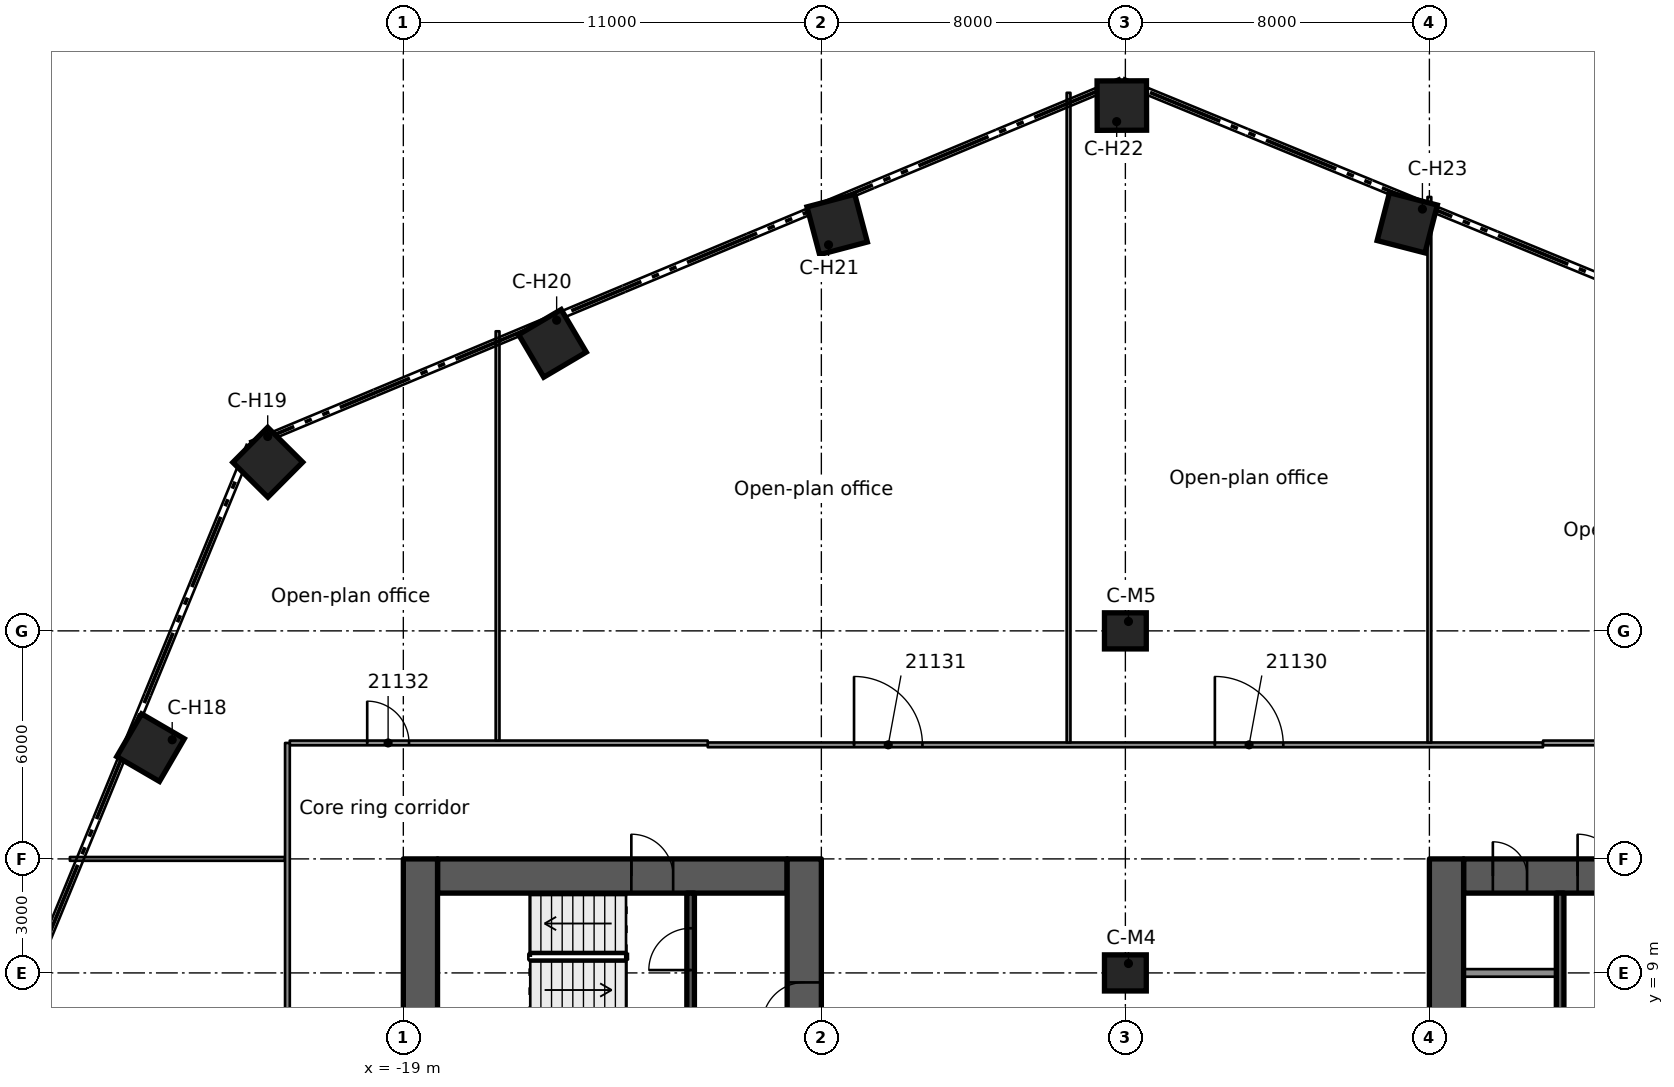
"""IFC4 building model, lengths in metres.
Left out: names, types, materials, properties, quantities, classifications, styles, units other than length and angle.
Written with IfcOpenShell. Run it as: python <this file> out.ifc"""

import sys

from ifc_helpers import new_model, si_unit, direction, frame, frame_2d, origin, origin_2d, place, context, subcontext, project, spatial, rectangle, extrude, element, fill, save


model = new_model("IFC4")
c1 = context("Model", 3, precision=1e-05, world=origin(), true_north=direction((0.0, 1.0)))
c2 = subcontext(c1, "Body", "Model", "MODEL_VIEW")
j1 = project(units=[si_unit("LENGTHUNIT", "METRE"), si_unit("PLANEANGLEUNIT", "RADIAN")], contexts=[c1])
p1 = place(None, origin())
s1 = spatial("IfcSite", under=j1, at=p1, CompositionType="ELEMENT")
p2 = place(p1, origin())
s2 = spatial("IfcBuilding", under=s1, at=p2, CompositionType="ELEMENT")
p3 = place(p2, frame((0.0, 0.0, 105.7)))
s3 = spatial("IfcBuildingStorey", under=s2, at=p3, CompositionType="ELEMENT", Elevation=105.7)
p4 = place(p3, frame((-18.1, 11.55, 0.0), z_axis=(0.0, 0.0, 1.0), x_axis=(1.0, 0.0, 0.0)))
e1 = element("IfcWall", 1, at=p4, inside=s3, PredefinedType="SHEAR", context=c2, shape_type="SweptSolid", body=[
    extrude(rectangle(XDim=9.2, YDim=0.9, at=frame_2d((4.6, 0.0))), origin(), (0.0, 0.0, 1.0), 3.5),
])
p5 = place(p4, frame((5.1, 0.0, 0.0)))
e2 = element("IfcOpeningElement", 2, at=p5, cuts=e1, PredefinedType="OPENING", context=c2, shape_type="SweptSolid", body=[
    extrude(rectangle(XDim=1.1, YDim=2.1, at=frame_2d((0.55, 1.05))), frame((0.0, 0.46, 0.0), z_axis=(0.0, -1.0, 0.0), x_axis=(1.0, 0.0, 0.0)), (0.0, 0.0, 1.0), 0.92),
])
p6 = place(p3, frame((-18.55, -12.0, 0.0), z_axis=(0.0, 0.0, 1.0), x_axis=(0.0, 1.0, 0.0)))
e3 = element("IfcWall", 3, at=p6, inside=s3, PredefinedType="SHEAR", context=c2, shape_type="SweptSolid", body=[
    extrude(rectangle(XDim=24.0, YDim=0.9, at=frame_2d((12.0, 0.0))), origin(), (0.0, 0.0, 1.0), 3.5),
])
p7 = place(p6, frame((10.1, 0.0, 0.0)))
e4 = element("IfcOpeningElement", 4, at=p7, cuts=e3, PredefinedType="OPENING", context=c2, shape_type="SweptSolid", body=[
    extrude(rectangle(XDim=1.8, YDim=2.1, at=frame_2d((0.9, 1.05))), frame((0.0, 0.46, 0.0), z_axis=(0.0, -1.0, 0.0), x_axis=(1.0, 0.0, 0.0)), (0.0, 0.0, 1.0), 0.92),
])
p8 = place(p3, frame((-8.45, -12.0, 0.0), z_axis=(0.0, 0.0, 1.0), x_axis=(0.0, 1.0, 0.0)))
e5 = element("IfcWall", 5, at=p8, inside=s3, PredefinedType="SHEAR", context=c2, shape_type="SweptSolid", body=[
    extrude(rectangle(XDim=24.0, YDim=0.9, at=frame_2d((12.0, 0.0))), origin(), (0.0, 0.0, 1.0), 3.5),
])
p9 = place(p8, frame((9.6, 0.0, 0.0)))
e6 = element("IfcOpeningElement", 6, at=p9, cuts=e5, PredefinedType="OPENING", context=c2, shape_type="SweptSolid", body=[
    extrude(rectangle(XDim=1.8, YDim=2.1, at=frame_2d((0.9, 1.05))), frame((0.0, 0.46, 0.0), z_axis=(0.0, -1.0, 0.0), x_axis=(1.0, 0.0, 0.0)), (0.0, 0.0, 1.0), 0.92),
])
p10 = place(p8, frame((19.65, 0.0, 0.0)))
e7 = element("IfcOpeningElement", 7, at=p10, cuts=e5, PredefinedType="OPENING", context=c2, shape_type="SweptSolid", body=[
    extrude(rectangle(XDim=1.1, YDim=2.1, at=frame_2d((0.55, 1.05))), frame((0.0, 0.46, 0.0), z_axis=(0.0, -1.0, 0.0), x_axis=(1.0, 0.0, 0.0)), (0.0, 0.0, 1.0), 0.92),
])
p11 = place(p3, frame((8.9, 11.55, 0.0), z_axis=(0.0, 0.0, 1.0), x_axis=(1.0, 0.0, 0.0)))
e8 = element("IfcWall", 8, at=p11, inside=s3, PredefinedType="SHEAR", context=c2, shape_type="SweptSolid", body=[
    extrude(rectangle(XDim=9.2, YDim=0.9, at=frame_2d((4.6, 0.0))), origin(), (0.0, 0.0, 1.0), 3.5),
])
p12 = place(p11, frame((3.0, 0.0, 0.0)))
e9 = element("IfcOpeningElement", 9, at=p12, cuts=e8, PredefinedType="OPENING", context=c2, shape_type="SweptSolid", body=[
    extrude(rectangle(XDim=1.1, YDim=2.1, at=frame_2d((0.55, 1.05))), frame((0.0, 0.46, 0.0), z_axis=(0.0, -1.0, 0.0), x_axis=(1.0, 0.0, 0.0)), (0.0, 0.0, 1.0), 0.92),
])
p13 = place(p11, frame((0.77, 0.0, 0.0)))
e10 = element("IfcOpeningElement", 10, at=p13, cuts=e8, PredefinedType="OPENING", context=c2, shape_type="SweptSolid", body=[
    extrude(rectangle(XDim=0.9, YDim=2.1, at=frame_2d((0.45, 1.05))), frame((0.0, 0.46, 0.0), z_axis=(0.0, -1.0, 0.0), x_axis=(1.0, 0.0, 0.0)), (0.0, 0.0, 1.0), 0.92),
])
p14 = place(p3, frame((8.45, -12.0, 0.0), z_axis=(0.0, 0.0, 1.0), x_axis=(0.0, 1.0, 0.0)))
e11 = element("IfcWall", 11, at=p14, inside=s3, PredefinedType="SHEAR", context=c2, shape_type="SweptSolid", body=[
    extrude(rectangle(XDim=24.0, YDim=0.9, at=frame_2d((12.0, 0.0))), origin(), (0.0, 0.0, 1.0), 3.5),
])
p15 = place(p14, frame((12.6, 0.0, 0.0)))
e12 = element("IfcOpeningElement", 12, at=p15, cuts=e11, PredefinedType="OPENING", context=c2, shape_type="SweptSolid", body=[
    extrude(rectangle(XDim=1.8, YDim=2.1, at=frame_2d((0.9, 1.05))), frame((0.0, 0.46, 0.0), z_axis=(0.0, -1.0, 0.0), x_axis=(1.0, 0.0, 0.0)), (0.0, 0.0, 1.0), 0.92),
])
p16 = place(p14, frame((3.25, 0.0, 0.0)))
e13 = element("IfcOpeningElement", 13, at=p16, cuts=e11, PredefinedType="OPENING", context=c2, shape_type="SweptSolid", body=[
    extrude(rectangle(XDim=1.1, YDim=2.1, at=frame_2d((0.55, 1.05))), frame((0.0, 0.46, 0.0), z_axis=(0.0, -1.0, 0.0), x_axis=(1.0, 0.0, 0.0)), (0.0, 0.0, 1.0), 0.92),
])
for number, where, z_axis, x_axis in (
    (14, (-28.737, 7.417, 0.0), (0.0, 0.0, 1.0), (-0.968, 0.25, 0.0)),
    (15, (-25.652, 14.927, 0.0), (0.0, 0.0, 1.0), (-0.864, 0.503, 0.0)),
    (16, (-22.567, 22.436, 0.0), (0.0, 0.0, 1.0), (-0.709, 0.705, 0.0)),
    (17, (-15.076, 25.565, 0.0), (0.0, 0.0, 1.0), (-0.508, 0.861, 0.0)),
    (18, (-7.584, 28.694, 0.0), (0.0, 0.0, 1.0), (-0.256, 0.967, 0.0)),
    (19, (-0.093, 31.822, 0.0), (0.0, 0.0, 1.0), (-0.003, 1.0, 0.0)),
    (20, (7.417, 28.737, 0.0), (0.0, 0.0, 1.0), (0.25, 0.968, 0.0)),
):
    element("IfcColumn", number, at=place(p3, frame(where, z_axis=z_axis, x_axis=x_axis)), inside=s3, PredefinedType="COLUMN", context=c2, shape_type="SweptSolid", body=[
        extrude(rectangle(XDim=1.3, YDim=1.3, at=origin_2d()), origin(), (0.0, 0.0, 1.0), 3.5),
    ])
for number, where, z_axis, x_axis in (
    (21, (0.0, 9.0, 0.0), (0.0, 0.0, 1.0), (1.0, 0.0, 0.0)),
    (22, (0.0, 18.0, 0.0), (0.0, 0.0, 1.0), (1.0, 0.0, 0.0)),
):
    element("IfcColumn", number, at=place(p3, frame(where, z_axis=z_axis, x_axis=x_axis)), inside=s3, PredefinedType="COLUMN", context=c2, shape_type="SweptSolid", body=[
        extrude(rectangle(XDim=1.1, YDim=0.95, at=origin_2d()), origin(), (0.0, 0.0, 1.0), 3.5),
    ])
p17 = place(p3, frame((-11.44, 6.975, 0.0), z_axis=(0.0, 0.0, 1.0), x_axis=(0.0, 1.0, 0.0)))
e23 = element("IfcWall", 23, at=p17, inside=s3, PredefinedType="SOLIDWALL", context=c2, shape_type="SweptSolid", body=[
    extrude(rectangle(XDim=4.125, YDim=0.2, at=frame_2d((2.062, 0.0))), origin(), (0.0, 0.0, 1.0), 3.09),
])
p18 = place(p17, frame((2.1, 0.0, 0.0)))
e24 = element("IfcOpeningElement", 24, at=p18, cuts=e23, PredefinedType="OPENING", context=c2, shape_type="SweptSolid", body=[
    extrude(rectangle(XDim=1.1, YDim=2.1, at=frame_2d((0.55, 1.05))), frame((0.0, 0.11, 0.0), z_axis=(0.0, -1.0, 0.0), x_axis=(1.0, 0.0, 0.0)), (0.0, 0.0, 1.0), 0.22),
])
p19 = place(p3, frame((11.44, 11.1, 0.0), z_axis=(0.0, 0.0, 1.0), x_axis=(0.0, -1.0, 0.0)))
e25 = element("IfcWall", 25, at=p19, inside=s3, PredefinedType="SOLIDWALL", context=c2, shape_type="SweptSolid", body=[
    extrude(rectangle(XDim=4.125, YDim=0.2, at=frame_2d((2.062, 0.0))), origin(), (0.0, 0.0, 1.0), 3.09),
])
p20 = place(p3, frame((8.9, 9.0, 0.0), z_axis=(0.0, 0.0, 1.0), x_axis=(1.0, 0.0, 0.0)))
e26 = element("IfcWall", 26, at=p20, inside=s3, PredefinedType="PARTITIONING", context=c2, shape_type="SweptSolid", body=[
    extrude(rectangle(XDim=2.44, YDim=0.2, at=frame_2d((1.22, 0.0))), origin(), (0.0, 0.0, 1.0), 3.09),
])
p21 = place(p3, frame((-27.774, 12.0, 0.0), z_axis=(0.0, 0.0, 1.0), x_axis=(1.0, 0.0, 0.0)))
e27 = element("IfcWall", 27, at=p21, inside=s3, PredefinedType="PARTITIONING", context=c2, shape_type="SweptSolid", body=[
    extrude(rectangle(XDim=5.661, YDim=0.1, at=frame_2d((2.831, 0.0))), origin(), (0.0, 0.0, 1.0), 3.08),
])
p22 = place(p3, frame((-10.99, 15.001, 0.0), z_axis=(0.0, 0.0, 1.0), x_axis=(1.0, 0.0, 0.0)))
e28 = element("IfcWall", 28, at=p22, inside=s3, PredefinedType="PARTITIONING", context=c2, shape_type="SweptSolid", body=[
    extrude(rectangle(XDim=21.98, YDim=0.125, at=frame_2d((10.99, 0.0))), origin(), (0.0, 0.0, 1.0), 3.08),
])
p23 = place(p22, frame((13.345, 0.0, 0.0)))
e29 = element("IfcOpeningElement", 29, at=p23, cuts=e28, PredefinedType="OPENING", context=c2, shape_type="SweptSolid", body=[
    extrude(rectangle(XDim=1.8, YDim=2.1, at=frame_2d((0.9, 1.05))), frame((0.0, 0.073, 0.0), z_axis=(0.0, -1.0, 0.0), x_axis=(1.0, 0.0, 0.0)), (0.0, 0.0, 1.0), 0.145),
])
p24 = place(p22, frame((3.85, 0.0, 0.0)))
e30 = element("IfcOpeningElement", 30, at=p24, cuts=e28, PredefinedType="OPENING", context=c2, shape_type="SweptSolid", body=[
    extrude(rectangle(XDim=1.8, YDim=2.1, at=frame_2d((0.9, 1.05))), frame((0.0, 0.073, 0.0), z_axis=(0.0, -1.0, 0.0), x_axis=(1.0, 0.0, 0.0)), (0.0, 0.0, 1.0), 0.145),
])
p25 = place(p3, frame((-21.988, 15.051, 0.0), z_axis=(0.0, 0.0, 1.0), x_axis=(1.0, 0.0, 0.0)))
e31 = element("IfcWall", 31, at=p25, inside=s3, PredefinedType="PARTITIONING", context=c2, shape_type="SweptSolid", body=[
    extrude(rectangle(XDim=10.997, YDim=0.125, at=frame_2d((5.499, 0.0))), origin(), (0.0, 0.0, 1.0), 3.08),
])
p26 = place(p25, frame((2.038, 0.0, 0.0)))
e32 = element("IfcOpeningElement", 32, at=p26, cuts=e31, PredefinedType="OPENING", context=c2, shape_type="SweptSolid", body=[
    extrude(rectangle(XDim=1.1, YDim=2.1, at=frame_2d((0.55, 1.05))), frame((0.0, 0.073, 0.0), z_axis=(0.0, -1.0, 0.0), x_axis=(1.0, 0.0, 0.0)), (0.0, 0.0, 1.0), 0.145),
])
p27 = place(p3, frame((10.991, 15.051, 0.0), z_axis=(0.0, 0.0, 1.0), x_axis=(1.0, 0.0, 0.0)))
e33 = element("IfcWall", 33, at=p27, inside=s3, PredefinedType="PARTITIONING", context=c2, shape_type="SweptSolid", body=[
    extrude(rectangle(XDim=10.997, YDim=0.125, at=frame_2d((5.499, 0.0))), origin(), (0.0, 0.0, 1.0), 3.08),
])
p28 = place(p27, frame((4.6, 0.0, 0.0)))
e34 = element("IfcOpeningElement", 34, at=p28, cuts=e33, PredefinedType="OPENING", context=c2, shape_type="SweptSolid", body=[
    extrude(rectangle(XDim=1.8, YDim=2.1, at=frame_2d((0.9, 1.05))), frame((0.0, 0.073, 0.0), z_axis=(0.0, -1.0, 0.0), x_axis=(1.0, 0.0, 0.0)), (0.0, 0.0, 1.0), 0.145),
])
p29 = place(p3, frame((8.0, 15.063, 0.0), z_axis=(0.0, 0.0, 1.0), x_axis=(0.0, 1.0, 0.0)))
e35 = element("IfcWall", 35, at=p29, inside=s3, PredefinedType="PARTITIONING", context=c2, shape_type="SweptSolid", body=[
    extrude(rectangle(XDim=14.354, YDim=0.1, at=frame_2d((7.177, 0.0))), origin(), (0.0, 0.0, 1.0), 3.08),
])
p30 = place(p3, frame((-1.495, 15.063, 0.0), z_axis=(0.0, 0.0, 1.0), x_axis=(0.0, 1.0, 0.0)))
e36 = element("IfcWall", 36, at=p30, inside=s3, PredefinedType="PARTITIONING", context=c2, shape_type="SweptSolid", body=[
    extrude(rectangle(XDim=17.095, YDim=0.1, at=frame_2d((8.547, 0.0))), origin(), (0.0, 0.0, 1.0), 3.08),
])
p31 = place(p3, frame((-16.52, 15.114, 0.0), z_axis=(0.0, 0.0, 1.0), x_axis=(0.0, 1.0, 0.0)))
e37 = element("IfcWall", 37, at=p31, inside=s3, PredefinedType="PARTITIONING", context=c2, shape_type="SweptSolid", body=[
    extrude(rectangle(XDim=10.769, YDim=0.1, at=frame_2d((5.385, 0.0))), origin(), (0.0, 0.0, 1.0), 3.08),
])
p32 = place(p3, frame((-22.05, -15.051, 0.0), z_axis=(0.0, 0.0, 1.0), x_axis=(0.0, 1.0, 0.0)))
e38 = element("IfcWall", 38, at=p32, inside=s3, PredefinedType="PARTITIONING", context=c2, shape_type="SweptSolid", body=[
    extrude(rectangle(XDim=30.102, YDim=0.125, at=frame_2d((15.051, 0.0))), origin(), (0.0, 0.0, 1.0), 3.08),
])
p33 = place(p32, frame((6.35, 0.0, 0.0)))
e39 = element("IfcOpeningElement", 39, at=p33, cuts=e38, PredefinedType="OPENING", context=c2, shape_type="SweptSolid", body=[
    extrude(rectangle(XDim=0.9, YDim=2.1, at=frame_2d((0.45, 1.05))), frame((0.0, 0.073, 0.0), z_axis=(0.0, -1.0, 0.0), x_axis=(1.0, 0.0, 0.0)), (0.0, 0.0, 1.0), 0.145),
])
p34 = place(p32, frame((19.627, 0.0, 0.0)))
e40 = element("IfcOpeningElement", 40, at=p34, cuts=e38, PredefinedType="OPENING", context=c2, shape_type="SweptSolid", body=[
    extrude(rectangle(XDim=1.1, YDim=2.1, at=frame_2d((0.55, 1.05))), frame((0.0, 0.073, 0.0), z_axis=(0.0, -1.0, 0.0), x_axis=(1.0, 0.0, 0.0)), (0.0, 0.0, 1.0), 0.145),
])
p35 = place(p10, origin())
e41 = element("IfcDoor", 41, at=p35, inside=s3, OperationType="SINGLE_SWING_RIGHT", PredefinedType="DOOR", context=c2, shape_type="SweptSolid", body=[
    extrude(rectangle(XDim=1.1, YDim=2.1, at=frame_2d((0.55, 1.05))), frame((0.0, 0.025, 0.0), z_axis=(0.0, -1.0, 0.0), x_axis=(1.0, 0.0, 0.0)), (0.0, 0.0, 1.0), 0.05),
])
fill(e7, e41)
p36 = place(p5, origin())
e42 = element("IfcDoor", 42, at=p36, inside=s3, OperationType="SINGLE_SWING_RIGHT", PredefinedType="DOOR", context=c2, shape_type="SweptSolid", body=[
    extrude(rectangle(XDim=1.1, YDim=2.1, at=frame_2d((0.55, 1.05))), frame((0.0, 0.025, 0.0), z_axis=(0.0, -1.0, 0.0), x_axis=(1.0, 0.0, 0.0)), (0.0, 0.0, 1.0), 0.05),
])
fill(e2, e42)
p37 = place(p18, origin())
e43 = element("IfcDoor", 43, at=p37, inside=s3, OperationType="SINGLE_SWING_RIGHT", PredefinedType="DOOR", context=c2, shape_type="SweptSolid", body=[
    extrude(rectangle(XDim=1.1, YDim=2.1, at=frame_2d((0.55, 1.05))), frame((0.0, 0.025, 0.0), z_axis=(0.0, -1.0, 0.0), x_axis=(1.0, 0.0, 0.0)), (0.0, 0.0, 1.0), 0.05),
])
fill(e24, e43)
p38 = place(p12, origin())
e44 = element("IfcDoor", 44, at=p38, inside=s3, OperationType="SINGLE_SWING_LEFT", PredefinedType="DOOR", context=c2, shape_type="SweptSolid", body=[
    extrude(rectangle(XDim=1.1, YDim=2.1, at=frame_2d((0.55, 1.05))), frame((0.0, 0.025, 0.0), z_axis=(0.0, -1.0, 0.0), x_axis=(1.0, 0.0, 0.0)), (0.0, 0.0, 1.0), 0.05),
])
fill(e9, e44)
p39 = place(p13, origin())
e45 = element("IfcDoor", 45, at=p39, inside=s3, OperationType="SINGLE_SWING_LEFT", PredefinedType="DOOR", context=c2, shape_type="SweptSolid", body=[
    extrude(rectangle(XDim=0.9, YDim=2.1, at=frame_2d((0.45, 1.05))), frame((0.0, 0.025, 0.0), z_axis=(0.0, -1.0, 0.0), x_axis=(1.0, 0.0, 0.0)), (0.0, 0.0, 1.0), 0.05),
])
fill(e10, e45)
p40 = place(p23, origin())
e46 = element("IfcDoor", 46, at=p40, inside=s3, OperationType="DOUBLE_DOOR_SINGLE_SWING", PredefinedType="DOOR", context=c2, shape_type="SweptSolid", body=[
    extrude(rectangle(XDim=1.8, YDim=2.1, at=frame_2d((0.9, 1.05))), frame((0.0, 0.025, 0.0), z_axis=(0.0, -1.0, 0.0), x_axis=(1.0, 0.0, 0.0)), (0.0, 0.0, 1.0), 0.05),
])
fill(e29, e46)
p41 = place(p24, origin())
e47 = element("IfcDoor", 47, at=p41, inside=s3, OperationType="DOUBLE_DOOR_SINGLE_SWING", PredefinedType="DOOR", context=c2, shape_type="SweptSolid", body=[
    extrude(rectangle(XDim=1.8, YDim=2.1, at=frame_2d((0.9, 1.05))), frame((0.0, 0.025, 0.0), z_axis=(0.0, -1.0, 0.0), x_axis=(1.0, 0.0, 0.0)), (0.0, 0.0, 1.0), 0.05),
])
fill(e30, e47)
p42 = place(p26, origin())
e48 = element("IfcDoor", 48, at=p42, inside=s3, OperationType="SINGLE_SWING_LEFT", PredefinedType="DOOR", context=c2, shape_type="SweptSolid", body=[
    extrude(rectangle(XDim=1.1, YDim=2.1, at=frame_2d((0.55, 1.05))), frame((0.0, 0.025, 0.0), z_axis=(0.0, -1.0, 0.0), x_axis=(1.0, 0.0, 0.0)), (0.0, 0.0, 1.0), 0.05),
])
fill(e32, e48)
save(model, sys.argv[1])
